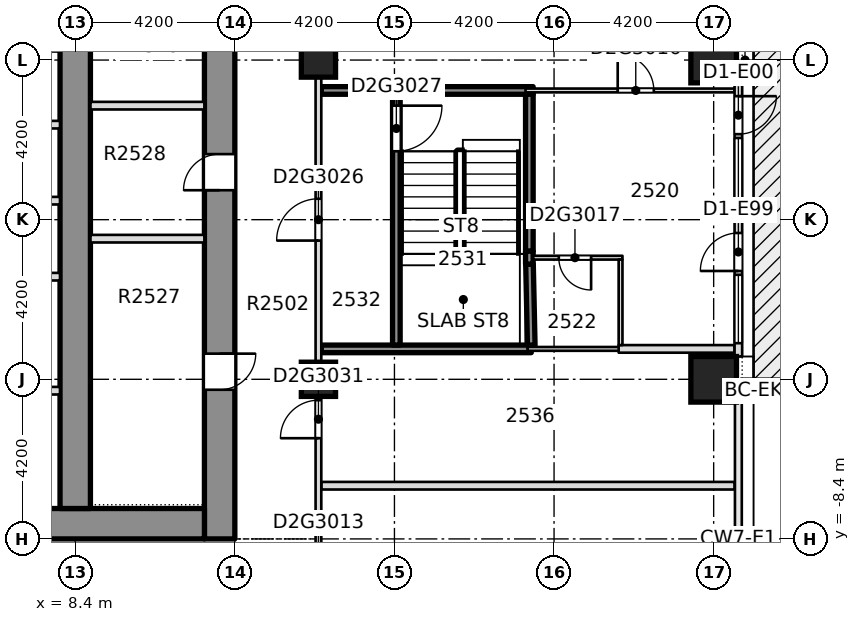
"""IFC4 building model, lengths in metres.
Left out: names, types, materials, properties, quantities, classifications, styles, units other than length and angle.
Written with IfcOpenShell. Run it as: python <this file> out.ifc"""

import sys

from ifc_helpers import new_model, si_unit, direction, frame, frame_2d, origin, origin_2d, place, context, subcontext, project, spatial, rectangle, extrude, element, fill, save


model = new_model("IFC4")
c1 = context("Model", 3, precision=1e-05, world=origin(), true_north=direction((0.0, 1.0)))
c2 = subcontext(c1, "Body", "Model", "MODEL_VIEW")
j1 = project(units=[si_unit("LENGTHUNIT", "METRE"), si_unit("PLANEANGLEUNIT", "RADIAN")], contexts=[c1])
p1 = place(None, origin())
s1 = spatial("IfcSite", under=j1, at=p1, CompositionType="ELEMENT")
p2 = place(p1, origin())
s2 = spatial("IfcBuilding", under=s1, at=p2, CompositionType="ELEMENT")
p3 = place(p2, frame((0.0, 0.0, 101.1)))
s3 = spatial("IfcBuildingStorey", under=s2, at=p3, CompositionType="ELEMENT", Elevation=101.1)
p4 = place(p3, frame((12.2, -8.4, -0.32), z_axis=(0.0, 0.0, 1.0), x_axis=(0.0, 1.0, 0.0)))
e1 = element("IfcWall", 1, at=p4, inside=s3, PredefinedType="SHEAR", context=c2, shape_type="SweptSolid", body=[
    extrude(rectangle(XDim=30.15, YDim=0.8, at=frame_2d((15.075, 0.0))), origin(), (0.0, 0.0, 1.0), 3.45),
])
p5 = place(p4, frame((3.925, 0.0, 0.32)))
e2 = element("IfcOpeningElement", 2, at=p5, cuts=e1, PredefinedType="OPENING", context=c2, shape_type="SweptSolid", body=[
    extrude(rectangle(XDim=0.95, YDim=2.1, at=frame_2d((0.475, 1.05))), frame((0.0, 0.41, 0.0), z_axis=(0.0, -1.0, 0.0), x_axis=(1.0, 0.0, 0.0)), (0.0, 0.0, 1.0), 0.82),
])
p6 = place(p4, frame((9.175, 0.0, 0.32)))
e3 = element("IfcOpeningElement", 3, at=p6, cuts=e1, PredefinedType="OPENING", context=c2, shape_type="SweptSolid", body=[
    extrude(rectangle(XDim=0.95, YDim=2.1, at=frame_2d((0.475, 1.05))), frame((0.0, 0.41, 0.0), z_axis=(0.0, -1.0, 0.0), x_axis=(1.0, 0.0, 0.0)), (0.0, 0.0, 1.0), 0.82),
])
p7 = place(p4, frame((14.525, 0.0, 0.32)))
e4 = element("IfcOpeningElement", 4, at=p7, cuts=e1, PredefinedType="OPENING", context=c2, shape_type="SweptSolid", body=[
    extrude(rectangle(XDim=0.95, YDim=2.1, at=frame_2d((0.475, 1.05))), frame((0.0, 0.41, 0.0), z_axis=(0.0, -1.0, 0.0), x_axis=(1.0, 0.0, 0.0)), (0.0, 0.0, 1.0), 0.82),
])
p8 = place(p4, frame((22.225, 0.0, 0.32)))
e5 = element("IfcOpeningElement", 5, at=p8, cuts=e1, PredefinedType="OPENING", context=c2, shape_type="SweptSolid", body=[
    extrude(rectangle(XDim=0.95, YDim=2.1, at=frame_2d((0.475, 1.05))), frame((0.0, 0.41, 0.0), z_axis=(0.0, -1.0, 0.0), x_axis=(1.0, 0.0, 0.0)), (0.0, 0.0, 1.0), 0.82),
])
p9 = place(p4, frame((26.25, 0.0, 0.32)))
e6 = element("IfcOpeningElement", 6, at=p9, cuts=e1, PredefinedType="OPENING", context=c2, shape_type="SweptSolid", body=[
    extrude(rectangle(XDim=0.95, YDim=2.1, at=frame_2d((0.475, 1.05))), frame((0.0, 0.41, 0.0), z_axis=(0.0, -1.0, 0.0), x_axis=(1.0, 0.0, 0.0)), (0.0, 0.0, 1.0), 0.82),
])
p10 = place(p4, frame((19.3, 0.0, 0.32)))
e7 = element("IfcOpeningElement", 7, at=p10, cuts=e1, PredefinedType="OPENING", context=c2, shape_type="SweptSolid", body=[
    extrude(rectangle(XDim=1.2, YDim=2.1, at=frame_2d((0.6, 1.05))), frame((0.0, 0.41, 0.0), z_axis=(0.0, -1.0, 0.0), x_axis=(1.0, 0.0, 0.0)), (0.0, 0.0, 1.0), 0.82),
])
p11 = place(p3, frame((-11.8, -8.0, -0.32), z_axis=(0.0, 0.0, 1.0), x_axis=(1.0, 0.0, 0.0)))
e8 = element("IfcWall", 8, at=p11, inside=s3, PredefinedType="SHEAR", context=c2, shape_type="SweptSolid", body=[
    extrude(rectangle(XDim=23.6, YDim=0.8, at=frame_2d((11.8, 0.0))), origin(), (0.0, 0.0, 1.0), 3.45),
])
p12 = place(p11, frame((7.05, 0.0, 0.32)))
e9 = element("IfcOpeningElement", 9, at=p12, cuts=e8, PredefinedType="OPENING", context=c2, shape_type="SweptSolid", body=[
    extrude(rectangle(XDim=1.8, YDim=2.1, at=frame_2d((0.9, 1.05))), frame((0.0, 0.41, 0.0), z_axis=(0.0, -1.0, 0.0), x_axis=(1.0, 0.0, 0.0)), (0.0, 0.0, 1.0), 0.82),
])
p13 = place(p11, frame((14.75, 0.0, 0.32)))
e10 = element("IfcOpeningElement", 10, at=p13, cuts=e8, PredefinedType="OPENING", context=c2, shape_type="SweptSolid", body=[
    extrude(rectangle(XDim=1.8, YDim=2.1, at=frame_2d((0.9, 1.05))), frame((0.0, 0.41, 0.0), z_axis=(0.0, -1.0, 0.0), x_axis=(1.0, 0.0, 0.0)), (0.0, 0.0, 1.0), 0.82),
])
p14 = place(p3, frame((8.4, -7.6, -0.32), z_axis=(0.0, 0.0, 1.0), x_axis=(0.0, 1.0, 0.0)))
e11 = element("IfcWall", 11, at=p14, inside=s3, PredefinedType="SHEAR", context=c2, shape_type="SweptSolid", body=[
    extrude(rectangle(XDim=28.55, YDim=0.8, at=frame_2d((14.275, 0.0))), origin(), (0.0, 0.0, 1.0), 3.45),
])
p15 = place(p14, frame((18.5, 0.0, 0.32)))
e12 = element("IfcOpeningElement", 12, at=p15, cuts=e11, PredefinedType="OPENING", context=c2, shape_type="SweptSolid", body=[
    extrude(rectangle(XDim=1.2, YDim=2.1, at=frame_2d((0.6, 1.05))), frame((0.0, 0.41, 0.0), z_axis=(0.0, -1.0, 0.0), x_axis=(1.0, 0.0, 0.0)), (0.0, 0.0, 1.0), 0.82),
])
for number, where, z_axis, x_axis in (
    (13, (25.2, -4.2, -0.32), (0.0, 0.0, 1.0), (1.0, 0.0, 0.0)),
    (14, (25.2, 4.2, -0.32), (0.0, 0.0, 1.0), (1.0, 0.0, 0.0)),
):
    element("IfcColumn", number, at=place(p3, frame(where, z_axis=z_axis, x_axis=x_axis)), inside=s3, PredefinedType="COLUMN", context=c2, shape_type="SweptSolid", body=[
        extrude(rectangle(XDim=1.2, YDim=1.2, at=origin_2d()), origin(), (0.0, 0.0, 1.0), 3.45),
    ])
for number, where, z_axis, x_axis in (
    (15, (14.8, -4.2, -0.32), (0.0, 0.0, 1.0), (1.0, 0.0, 0.0)),
    (16, (14.8, 4.2, -0.32), (0.0, 0.0, 1.0), (1.0, 0.0, 0.0)),
):
    element("IfcColumn", number, at=place(p3, frame(where, z_axis=z_axis, x_axis=x_axis)), inside=s3, PredefinedType="COLUMN", context=c2, shape_type="SweptSolid", body=[
        extrude(rectangle(XDim=0.9, YDim=0.9, at=origin_2d()), origin(), (0.0, 0.0, 1.0), 3.45),
    ])
p16 = place(p3, frame((14.875, -7.0, 0.0), z_axis=(0.0, 0.0, 1.0), x_axis=(1.0, 0.0, 0.0)))
e17 = element("IfcWall", 17, at=p16, inside=s3, PredefinedType="PARTITIONING", context=c2, shape_type="SweptSolid", body=[
    extrude(rectangle(XDim=10.875, YDim=0.2, at=frame_2d((5.438, 0.0))), origin(), (0.0, 0.0, 1.0), 3.13),
])
p17 = place(p3, frame((14.875, -3.4, 0.0), z_axis=(0.0, 0.0, 1.0), x_axis=(1.0, 0.0, 0.0)))
e18 = element("IfcWall", 18, at=p17, inside=s3, PredefinedType="SOLIDWALL", context=c2, shape_type="SweptSolid", body=[
    extrude(rectangle(XDim=5.525, YDim=0.2, at=frame_2d((2.762, 0.0))), origin(), (0.0, 0.0, 1.0), 3.13),
])
p18 = place(p3, frame((20.3, -3.4, 0.0), z_axis=(0.0, 0.0, 1.0), x_axis=(1.0, 0.0, 0.0)))
e19 = element("IfcWall", 19, at=p18, inside=s3, PredefinedType="PARTITIONING", context=c2, shape_type="SweptSolid", body=[
    extrude(rectangle(XDim=2.5, YDim=0.1, at=frame_2d((1.25, 0.0))), origin(), (0.0, 0.0, 1.0), 3.13),
])
p19 = place(p3, frame((22.7, -3.4, 0.0), z_axis=(0.0, 0.0, 1.0), x_axis=(1.0, 0.0, 0.0)))
e20 = element("IfcWall", 20, at=p19, inside=s3, PredefinedType="PARTITIONING", context=c2, shape_type="SweptSolid", body=[
    extrude(rectangle(XDim=3.05, YDim=0.2, at=frame_2d((1.525, 0.0))), origin(), (0.0, 0.0, 1.0), 3.13),
])
p20 = place(p3, frame((20.45, -1.0, 0.0), z_axis=(0.0, 0.0, 1.0), x_axis=(1.0, 0.0, 0.0)))
e21 = element("IfcWall", 21, at=p20, inside=s3, PredefinedType="PARTITIONING", context=c2, shape_type="SweptSolid", body=[
    extrude(rectangle(XDim=2.35, YDim=0.1, at=frame_2d((1.175, 0.0))), origin(), (0.0, 0.0, 1.0), 3.13),
])
p21 = place(p20, frame((0.675, 0.0, 0.0)))
e22 = element("IfcOpeningElement", 22, at=p21, cuts=e21, PredefinedType="OPENING", context=c2, shape_type="SweptSolid", body=[
    extrude(rectangle(XDim=0.85, YDim=2.1, at=frame_2d((0.425, 1.05))), frame((0.0, 0.06, 0.0), z_axis=(0.0, -1.0, 0.0), x_axis=(1.0, 0.0, 0.0)), (0.0, 0.0, 1.0), 0.12),
])
p22 = place(p3, frame((14.875, 3.4, 0.0), z_axis=(0.0, 0.0, 1.0), x_axis=(1.0, 0.0, 0.0)))
e23 = element("IfcWall", 23, at=p22, inside=s3, PredefinedType="SOLIDWALL", context=c2, shape_type="SweptSolid", body=[
    extrude(rectangle(XDim=5.575, YDim=0.2, at=frame_2d((2.788, 0.0))), origin(), (0.0, 0.0, 1.0), 3.13),
])
p23 = place(p3, frame((20.25, 3.4, 0.0), z_axis=(0.0, 0.0, 1.0), x_axis=(1.0, 0.0, 0.0)))
e24 = element("IfcWall", 24, at=p23, inside=s3, PredefinedType="PARTITIONING", context=c2, shape_type="SweptSolid", body=[
    extrude(rectangle(XDim=5.5, YDim=0.1, at=frame_2d((2.75, 0.0))), origin(), (0.0, 0.0, 1.0), 3.13),
])
p24 = place(p23, frame((2.425, 0.0, 0.0)))
e25 = element("IfcOpeningElement", 25, at=p24, cuts=e24, PredefinedType="OPENING", context=c2, shape_type="SweptSolid", body=[
    extrude(rectangle(XDim=0.95, YDim=2.1, at=frame_2d((0.475, 1.05))), frame((0.0, 0.06, 0.0), z_axis=(0.0, -1.0, 0.0), x_axis=(1.0, 0.0, 0.0)), (0.0, 0.0, 1.0), 0.12),
])
p25 = place(p3, frame((14.8, -10.6, 0.0), z_axis=(0.0, 0.0, 1.0), x_axis=(0.0, 1.0, 0.0)))
e26 = element("IfcWall", 26, at=p25, inside=s3, PredefinedType="PARTITIONING", context=c2, shape_type="SweptSolid", body=[
    extrude(rectangle(XDim=32.15, YDim=0.15, at=frame_2d((16.075, 0.0))), origin(), (0.0, 0.0, 1.0), 3.13),
])
p26 = place(p25, frame((1.05, 0.0, 0.0)))
e27 = element("IfcOpeningElement", 27, at=p26, cuts=e26, PredefinedType="OPENING", context=c2, shape_type="SweptSolid", body=[
    extrude(rectangle(XDim=0.95, YDim=2.1, at=frame_2d((0.475, 1.05))), frame((0.0, 0.085, 0.0), z_axis=(0.0, -1.0, 0.0), x_axis=(1.0, 0.0, 0.0)), (0.0, 0.0, 1.0), 0.17),
])
p27 = place(p25, frame((18.475, 0.0, 0.0)))
e28 = element("IfcOpeningElement", 28, at=p27, cuts=e26, PredefinedType="OPENING", context=c2, shape_type="SweptSolid", body=[
    extrude(rectangle(XDim=1.0, YDim=2.1, at=frame_2d((0.5, 1.05))), frame((0.0, 0.085, 0.0), z_axis=(0.0, -1.0, 0.0), x_axis=(1.0, 0.0, 0.0)), (0.0, 0.0, 1.0), 0.17),
])
p28 = place(p25, frame((25.55, 0.0, 0.0)))
e29 = element("IfcOpeningElement", 29, at=p28, cuts=e26, PredefinedType="OPENING", context=c2, shape_type="SweptSolid", body=[
    extrude(rectangle(XDim=0.95, YDim=2.1, at=frame_2d((0.475, 1.05))), frame((0.0, 0.085, 0.0), z_axis=(0.0, -1.0, 0.0), x_axis=(1.0, 0.0, 0.0)), (0.0, 0.0, 1.0), 0.17),
])
p29 = place(p25, frame((29.45, 0.0, 0.0)))
e30 = element("IfcOpeningElement", 30, at=p29, cuts=e26, PredefinedType="OPENING", context=c2, shape_type="SweptSolid", body=[
    extrude(rectangle(XDim=0.95, YDim=2.1, at=frame_2d((0.475, 1.05))), frame((0.0, 0.085, 0.0), z_axis=(0.0, -1.0, 0.0), x_axis=(1.0, 0.0, 0.0)), (0.0, 0.0, 1.0), 0.17),
])
p30 = place(p25, frame((10.05, 0.0, 0.0)))
e31 = element("IfcOpeningElement", 31, at=p30, cuts=e26, PredefinedType="OPENING", context=c2, shape_type="SweptSolid", body=[
    extrude(rectangle(XDim=1.1, YDim=2.1, at=frame_2d((0.55, 1.05))), frame((0.0, 0.085, 0.0), z_axis=(0.0, -1.0, 0.0), x_axis=(1.0, 0.0, 0.0)), (0.0, 0.0, 1.0), 0.17),
])
p31 = place(p25, frame((4.85, 0.0, 0.0)))
e32 = element("IfcOpeningElement", 32, at=p31, cuts=e26, PredefinedType="OPENING", context=c2, shape_type="SweptSolid", body=[
    extrude(rectangle(XDim=1.0, YDim=2.1, at=frame_2d((0.5, 1.05))), frame((0.0, 0.085, 0.0), z_axis=(0.0, -1.0, 0.0), x_axis=(1.0, 0.0, 0.0)), (0.0, 0.0, 1.0), 0.17),
])
p32 = place(p3, frame((16.85, -3.3, 0.0), z_axis=(0.0, 0.0, 1.0), x_axis=(0.0, 1.0, 0.0)))
e33 = element("IfcWall", 33, at=p32, inside=s3, PredefinedType="SOLIDWALL", context=c2, shape_type="SweptSolid", body=[
    extrude(rectangle(XDim=6.6, YDim=0.2, at=frame_2d((3.3, 0.0))), origin(), (0.0, 0.0, 1.0), 3.13),
])
p33 = place(p32, frame((5.1, 0.0, 0.0)))
e34 = element("IfcOpeningElement", 34, at=p33, cuts=e33, PredefinedType="OPENING", context=c2, shape_type="SweptSolid", body=[
    extrude(rectangle(XDim=1.2, YDim=2.1, at=frame_2d((0.6, 1.05))), frame((0.0, 0.11, 0.0), z_axis=(0.0, -1.0, 0.0), x_axis=(1.0, 0.0, 0.0)), (0.0, 0.0, 1.0), 0.22),
])
p34 = place(p3, frame((20.4, -3.3, 0.0), z_axis=(0.0, 0.0, 1.0), x_axis=(-0.021771342749, 0.999762976227, 0.0)))
e35 = element("IfcWall", 35, at=p34, inside=s3, PredefinedType="SOLIDWALL", context=c2, shape_type="SweptSolid", body=[
    extrude(rectangle(XDim=2.131, YDim=0.2, at=frame_2d((1.065, 0.0))), origin(), (0.0, 0.0, 1.0), 3.13),
])
p35 = place(p3, frame((20.35, -0.83, 0.0), z_axis=(0.0, 0.0, 1.0), x_axis=(0.0, 1.0, 0.0)))
e36 = element("IfcWall", 36, at=p35, inside=s3, PredefinedType="SOLIDWALL", context=c2, shape_type="SweptSolid", body=[
    extrude(rectangle(XDim=4.13, YDim=0.2, at=frame_2d((2.065, 0.0))), origin(), (0.0, 0.0, 1.0), 3.13),
])
p36 = place(p3, frame((22.75, -3.3, 0.0), z_axis=(0.0, 0.0, 1.0), x_axis=(0.0, 1.0, 0.0)))
e37 = element("IfcWall", 37, at=p36, inside=s3, PredefinedType="PARTITIONING", context=c2, shape_type="SweptSolid", body=[
    extrude(rectangle(XDim=2.25, YDim=0.1, at=frame_2d((1.125, 0.0))), origin(), (0.0, 0.0, 1.0), 3.13),
])
p37 = place(p3, frame((25.85, -3.6, 0.0), z_axis=(0.0, 0.0, 1.0), x_axis=(0.0, 1.0, 0.0)))
e38 = element("IfcWall", 38, at=p37, inside=s3, PredefinedType="STANDARD", context=c2, shape_type="SweptSolid", body=[
    extrude(rectangle(XDim=7.2, YDim=0.2, at=frame_2d((3.6, 0.0))), origin(), (0.0, 0.0, 1.0), 3.13),
])
p38 = place(p37, frame((0.35, 0.0, 0.2)))
e39 = element("IfcOpeningElement", 39, at=p38, cuts=e38, PredefinedType="OPENING", context=c2, shape_type="SweptSolid", body=[
    extrude(rectangle(XDim=1.8, YDim=2.65, at=frame_2d((0.9, 1.325))), frame((0.0, 0.11, 0.0), z_axis=(0.0, -1.0, 0.0), x_axis=(1.0, 0.0, 0.0)), (0.0, 0.0, 1.0), 0.22),
])
p39 = place(p37, frame((2.25, 0.0, 0.0)))
e40 = element("IfcOpeningElement", 40, at=p39, cuts=e38, PredefinedType="OPENING", context=c2, shape_type="SweptSolid", body=[
    extrude(rectangle(XDim=1.0, YDim=2.4, at=frame_2d((0.5, 1.2))), frame((0.0, 0.11, 0.0), z_axis=(0.0, -1.0, 0.0), x_axis=(1.0, 0.0, 0.0)), (0.0, 0.0, 1.0), 0.22),
])
p40 = place(p37, frame((3.95, 0.0, 0.2)))
e41 = element("IfcOpeningElement", 41, at=p40, cuts=e38, PredefinedType="OPENING", context=c2, shape_type="SweptSolid", body=[
    extrude(rectangle(XDim=1.8, YDim=2.65, at=frame_2d((0.9, 1.325))), frame((0.0, 0.11, 0.0), z_axis=(0.0, -1.0, 0.0), x_axis=(1.0, 0.0, 0.0)), (0.0, 0.0, 1.0), 0.22),
])
p41 = place(p37, frame((5.85, 0.0, 0.0)))
e42 = element("IfcOpeningElement", 42, at=p41, cuts=e38, PredefinedType="OPENING", context=c2, shape_type="SweptSolid", body=[
    extrude(rectangle(XDim=1.0, YDim=2.4, at=frame_2d((0.5, 1.2))), frame((0.0, 0.11, 0.0), z_axis=(0.0, -1.0, 0.0), x_axis=(1.0, 0.0, 0.0)), (0.0, 0.0, 1.0), 0.22),
])
for number, where, z_axis, x_axis in (
    (43, (5.575, -4.5, 0.0), (0.0, 0.0, 1.0), (1.0, 0.0, 0.0)),
    (44, (5.575, -1.5, 0.0), (0.0, 0.0, 1.0), (1.0, 0.0, 0.0)),
    (45, (5.575, 0.5, 0.0), (0.0, 0.0, 1.0), (1.0, 0.0, 0.0)),
    (46, (5.575, 2.5, 0.0), (0.0, 0.0, 1.0), (1.0, 0.0, 0.0)),
):
    element("IfcWall", number, at=place(p3, frame(where, z_axis=z_axis, x_axis=x_axis)), inside=s3, PredefinedType="PARTITIONING", context=c2, shape_type="SweptSolid", body=[
        extrude(rectangle(XDim=2.424, YDim=0.2, at=frame_2d((1.212, 0.0))), origin(), (0.0, 0.0, 1.0), 3.13),
    ])
for number, where, z_axis, x_axis in (
    (47, (8.801, -0.5, 0.0), (0.0, 0.0, 1.0), (1.0, 0.0, 0.0)),
    (48, (8.801, 3.0, 0.0), (0.0, 0.0, 1.0), (1.0, 0.0, 0.0)),
):
    element("IfcWall", number, at=place(p3, frame(where, z_axis=z_axis, x_axis=x_axis)), inside=s3, PredefinedType="PARTITIONING", context=c2, shape_type="SweptSolid", body=[
        extrude(rectangle(XDim=2.998, YDim=0.2, at=frame_2d((1.499, 0.0))), origin(), (0.0, 0.0, 1.0), 3.13),
    ])
p42 = place(p3, frame((20.35, -1.17, 0.0), z_axis=(0.0, 0.0, 1.0), x_axis=(0.0, 1.0, 0.0)))
e49 = element("IfcWall", 49, at=p42, inside=s3, PredefinedType="SOLIDWALL", context=c2, shape_type="SweptSolid", body=[
    extrude(rectangle(XDim=0.34, YDim=0.2, at=frame_2d((0.17, 0.0))), origin(), (0.0, 0.0, 1.0), 3.13),
])
p43 = place(p24, origin())
e50 = element("IfcDoor", 50, at=p43, inside=s3, OperationType="SINGLE_SWING_LEFT", PredefinedType="DOOR", context=c2, shape_type="SweptSolid", body=[
    extrude(rectangle(XDim=0.95, YDim=2.1, at=frame_2d((0.475, 1.05))), frame((0.0, 0.025, 0.0), z_axis=(0.0, -1.0, 0.0), x_axis=(1.0, 0.0, 0.0)), (0.0, 0.0, 1.0), 0.05),
])
fill(e25, e50)
p44 = place(p21, origin())
e51 = element("IfcDoor", 51, at=p44, inside=s3, OperationType="SINGLE_SWING_RIGHT", PredefinedType="DOOR", context=c2, shape_type="SweptSolid", body=[
    extrude(rectangle(XDim=0.85, YDim=2.1, at=frame_2d((0.425, 1.05))), frame((0.0, 0.025, 0.0), z_axis=(0.0, -1.0, 0.0), x_axis=(1.0, 0.0, 0.0)), (0.0, 0.0, 1.0), 0.05),
])
fill(e22, e51)
p45 = place(p30, origin())
e52 = element("IfcDoor", 52, at=p45, inside=s3, OperationType="SINGLE_SWING_LEFT", PredefinedType="DOOR", context=c2, shape_type="SweptSolid", body=[
    extrude(rectangle(XDim=1.1, YDim=2.1, at=frame_2d((0.55, 1.05))), frame((0.0, 0.025, 0.0), z_axis=(0.0, -1.0, 0.0), x_axis=(1.0, 0.0, 0.0)), (0.0, 0.0, 1.0), 0.05),
])
fill(e31, e52)
p46 = place(p33, origin())
e53 = element("IfcDoor", 53, at=p46, inside=s3, OperationType="SINGLE_SWING_LEFT", PredefinedType="DOOR", context=c2, shape_type="SweptSolid", body=[
    extrude(rectangle(XDim=1.2, YDim=2.1, at=frame_2d((0.6, 1.05))), frame((0.0, 0.025, 0.0), z_axis=(0.0, -1.0, 0.0), x_axis=(1.0, 0.0, 0.0)), (0.0, 0.0, 1.0), 0.05),
])
fill(e34, e53)
p47 = place(p31, origin())
e54 = element("IfcDoor", 54, at=p47, inside=s3, OperationType="SINGLE_SWING_LEFT", PredefinedType="DOOR", context=c2, shape_type="SweptSolid", body=[
    extrude(rectangle(XDim=1.0, YDim=2.1, at=frame_2d((0.5, 1.05))), frame((0.0, 0.025, 0.0), z_axis=(0.0, -1.0, 0.0), x_axis=(1.0, 0.0, 0.0)), (0.0, 0.0, 1.0), 0.05),
])
fill(e32, e54)
p48 = place(p38, origin())
e55 = element("IfcWindow", 55, at=p48, inside=s3, PartitioningType="SINGLE_PANEL", PredefinedType="WINDOW", context=c2, shape_type="SweptSolid", body=[
    extrude(rectangle(XDim=1.8, YDim=2.65, at=frame_2d((0.9, 1.325))), frame((0.0, 0.03, 0.0), z_axis=(0.0, -1.0, 0.0), x_axis=(1.0, 0.0, 0.0)), (0.0, 0.0, 1.0), 0.06),
])
fill(e39, e55)
p49 = place(p39, origin())
e56 = element("IfcDoor", 56, at=p49, inside=s3, OperationType="SINGLE_SWING_LEFT", PredefinedType="DOOR", context=c2, shape_type="SweptSolid", body=[
    extrude(rectangle(XDim=1.0, YDim=2.4, at=frame_2d((0.5, 1.2))), frame((0.0, 0.025, 0.0), z_axis=(0.0, -1.0, 0.0), x_axis=(1.0, 0.0, 0.0)), (0.0, 0.0, 1.0), 0.05),
])
fill(e40, e56)
p50 = place(p40, origin())
e57 = element("IfcWindow", 57, at=p50, inside=s3, PartitioningType="SINGLE_PANEL", PredefinedType="WINDOW", context=c2, shape_type="SweptSolid", body=[
    extrude(rectangle(XDim=1.8, YDim=2.65, at=frame_2d((0.9, 1.325))), frame((0.0, 0.03, 0.0), z_axis=(0.0, -1.0, 0.0), x_axis=(1.0, 0.0, 0.0)), (0.0, 0.0, 1.0), 0.06),
])
fill(e41, e57)
p51 = place(p41, origin())
e58 = element("IfcDoor", 58, at=p51, inside=s3, OperationType="SINGLE_SWING_LEFT", PredefinedType="DOOR", context=c2, shape_type="SweptSolid", body=[
    extrude(rectangle(XDim=1.0, YDim=2.4, at=frame_2d((0.5, 1.2))), frame((0.0, 0.025, 0.0), z_axis=(0.0, -1.0, 0.0), x_axis=(1.0, 0.0, 0.0)), (0.0, 0.0, 1.0), 0.05),
])
fill(e42, e58)
p52 = place(p5, origin())
e59 = element("IfcDoor", 59, at=p52, inside=s3, OperationType="SINGLE_SWING_LEFT", PredefinedType="DOOR", context=c2, shape_type="SweptSolid", body=[
    extrude(rectangle(XDim=0.95, YDim=2.1, at=frame_2d((0.475, 1.05))), frame((0.0, 0.025, 0.0), z_axis=(0.0, -1.0, 0.0), x_axis=(1.0, 0.0, 0.0)), (0.0, 0.0, 1.0), 0.05),
])
fill(e2, e59)
p53 = place(p6, origin())
e60 = element("IfcDoor", 60, at=p53, inside=s3, OperationType="SINGLE_SWING_LEFT", PredefinedType="DOOR", context=c2, shape_type="SweptSolid", body=[
    extrude(rectangle(XDim=0.95, YDim=2.1, at=frame_2d((0.475, 1.05))), frame((0.0, 0.025, 0.0), z_axis=(0.0, -1.0, 0.0), x_axis=(1.0, 0.0, 0.0)), (0.0, 0.0, 1.0), 0.05),
])
fill(e3, e60)
save(model, sys.argv[1])
